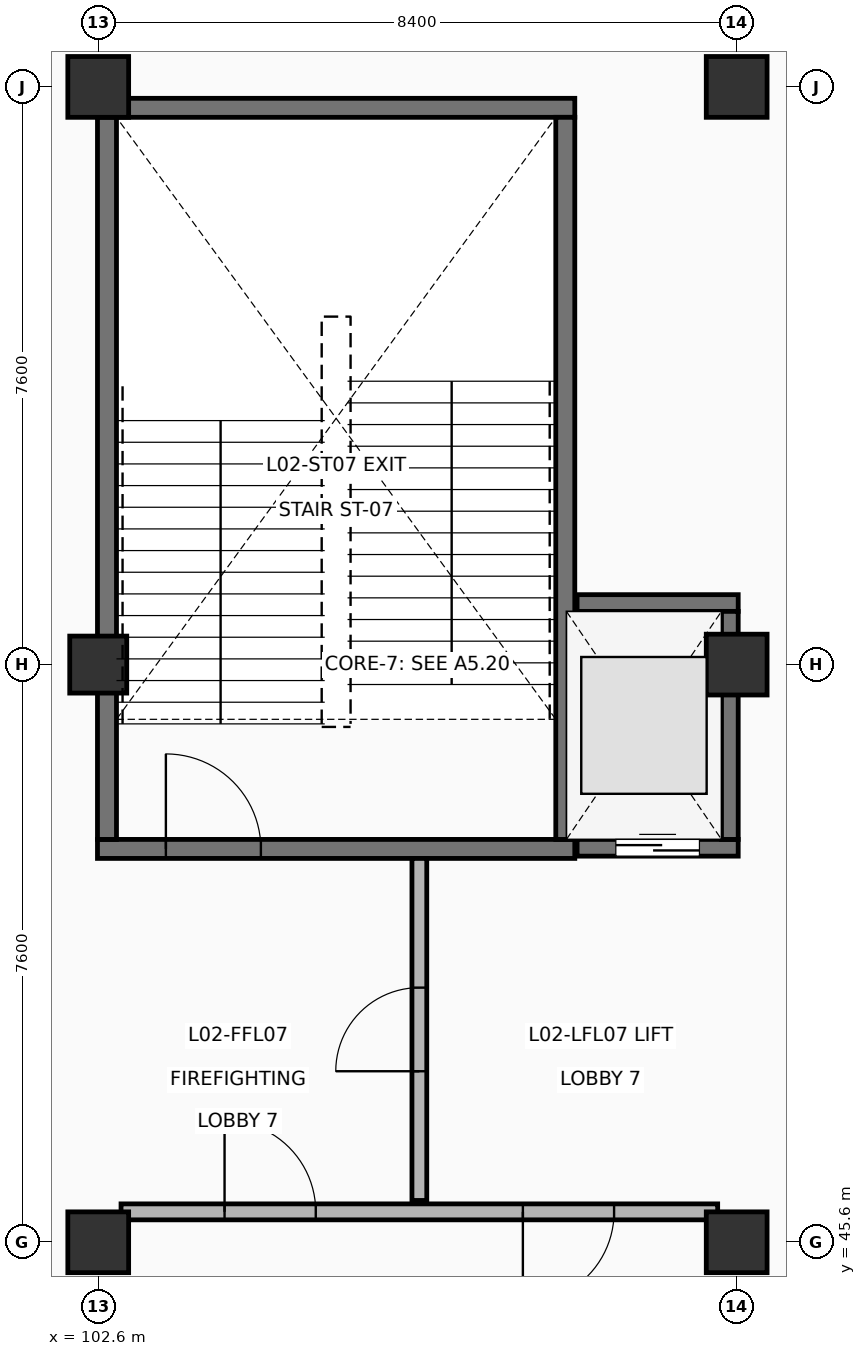
"""IFC4 building model, lengths in metres.
Left out: names, types, materials, properties, quantities, classifications, styles, units other than length and angle.
Written with IfcOpenShell. Run it as: python <this file> out.ifc"""

import sys

from ifc_helpers import new_model, si_unit, direction, frame, frame_2d, origin, origin_2d, place, context, subcontext, project, spatial, rectangle, circle, extrude, element, fill, save


model = new_model("IFC4")
c1 = context("Model", 3, precision=1e-05, world=origin(), true_north=direction((0.0, 1.0)))
c2 = subcontext(c1, "Body", "Model", "MODEL_VIEW")
j1 = project(units=[si_unit("LENGTHUNIT", "METRE"), si_unit("PLANEANGLEUNIT", "RADIAN")], contexts=[c1])
p1 = place(None, origin())
s1 = spatial("IfcSite", under=j1, at=p1, CompositionType="ELEMENT")
p2 = place(p1, origin())
s2 = spatial("IfcBuilding", under=s1, at=p2, CompositionType="ELEMENT")
p3 = place(p2, frame((0.0, 0.0, 5.4)))
s3 = spatial("IfcBuildingStorey", under=s2, at=p3, CompositionType="ELEMENT", Elevation=5.4)
p4 = place(p3, frame((102.6, 45.6, 0.0), z_axis=(0.0, 0.0, 1.0), x_axis=(1.0, 0.0, 0.0)))
e1 = element("IfcColumn", 1, at=p4, inside=s3, PredefinedType="COLUMN", context=c2, shape_type="SweptSolid", body=[
    extrude(rectangle(XDim=0.8, YDim=0.8, at=origin_2d()), origin(), (0.0, 0.0, 1.0), 5.1),
])
p5 = place(p3, frame((102.6, 53.2, 0.0), z_axis=(0.0, 0.0, 1.0), x_axis=(1.0, 0.0, 0.0)))
e2 = element("IfcColumn", 2, at=p5, inside=s3, PredefinedType="COLUMN", context=c2, shape_type="SweptSolid", body=[
    extrude(circle(Radius=0.375, at=origin_2d()), origin(), (0.0, 0.0, 1.0), 5.1),
])
for number, where, z_axis, x_axis in (
    (3, (102.6, 60.8, 0.0), (0.0, 0.0, 1.0), (1.0, 0.0, 0.0)),
    (4, (111.0, 45.6, 0.0), (0.0, 0.0, 1.0), (1.0, 0.0, 0.0)),
    (5, (111.0, 53.2, 0.0), (0.0, 0.0, 1.0), (1.0, 0.0, 0.0)),
    (6, (111.0, 60.8, 0.0), (0.0, 0.0, 1.0), (1.0, 0.0, 0.0)),
):
    element("IfcColumn", number, at=place(p3, frame(where, z_axis=z_axis, x_axis=x_axis)), inside=s3, PredefinedType="COLUMN", context=c2, shape_type="SweptSolid", body=[
        extrude(rectangle(XDim=0.8, YDim=0.8, at=origin_2d()), origin(), (0.0, 0.0, 1.0), 5.1),
    ])
p6 = place(p3, frame((102.59, 50.775, 0.0), z_axis=(0.0, 0.0, 1.0), x_axis=(1.0, 0.0, 0.0)))
e7 = element("IfcWall", 7, at=p6, inside=s3, PredefinedType="SHEAR", context=c2, shape_type="SweptSolid", body=[
    extrude(rectangle(XDim=6.28, YDim=0.25, at=frame_2d((3.14, 0.0))), origin(), (0.0, 0.0, 1.0), 4.86),
])
p7 = place(p6, frame((0.9, 0.0, 0.0)))
e8 = element("IfcOpeningElement", 8, at=p7, cuts=e7, PredefinedType="OPENING", context=c2, shape_type="SweptSolid", body=[
    extrude(rectangle(XDim=1.25, YDim=2.2, at=frame_2d((0.625, 1.1))), frame((0.0, 0.135, 0.0), z_axis=(0.0, -1.0, 0.0), x_axis=(1.0, 0.0, 0.0)), (0.0, 0.0, 1.0), 0.27),
])
p8 = place(p3, frame((102.59, 60.525, 0.0), z_axis=(0.0, 0.0, 1.0), x_axis=(1.0, 0.0, 0.0)))
e9 = element("IfcWall", 9, at=p8, inside=s3, PredefinedType="SHEAR", context=c2, shape_type="SweptSolid", body=[
    extrude(rectangle(XDim=6.28, YDim=0.25, at=frame_2d((3.14, 0.0))), origin(), (0.0, 0.0, 1.0), 4.86),
])
for number, where, z_axis, x_axis in (
    (10, (102.715, 50.9, 0.0), (0.0, 0.0, 1.0), (0.0, 1.0, 0.0)),
    (11, (108.745, 50.9, 0.0), (0.0, 0.0, 1.0), (0.0, 1.0, 0.0)),
):
    element("IfcWall", number, at=place(p3, frame(where, z_axis=z_axis, x_axis=x_axis)), inside=s3, PredefinedType="SHEAR", context=c2, shape_type="SweptSolid", body=[
        extrude(rectangle(XDim=9.5, YDim=0.25, at=frame_2d((4.75, 0.0))), origin(), (0.0, 0.0, 1.0), 4.86),
    ])
p9 = place(p3, frame((108.9, 50.79, 0.0), z_axis=(0.0, 0.0, 1.0), x_axis=(1.0, 0.0, 0.0)))
e12 = element("IfcWall", 12, at=p9, inside=s3, PredefinedType="SHEAR", context=c2, shape_type="SweptSolid", body=[
    extrude(rectangle(XDim=2.12, YDim=0.22, at=frame_2d((1.06, 0.0))), origin(), (0.0, 0.0, 1.0), 4.86),
])
p10 = place(p9, frame((0.51, 0.0, 0.0)))
e13 = element("IfcOpeningElement", 13, at=p10, cuts=e12, PredefinedType="OPENING", context=c2, shape_type="SweptSolid", body=[
    extrude(rectangle(XDim=1.1, YDim=2.15, at=frame_2d((0.55, 1.075))), frame((0.0, 0.12, 0.0), z_axis=(0.0, -1.0, 0.0), x_axis=(1.0, 0.0, 0.0)), (0.0, 0.0, 1.0), 0.24),
])
p11 = place(p3, frame((108.9, 54.01, 0.0), z_axis=(0.0, 0.0, 1.0), x_axis=(1.0, 0.0, 0.0)))
e14 = element("IfcWall", 14, at=p11, inside=s3, PredefinedType="SHEAR", context=c2, shape_type="SweptSolid", body=[
    extrude(rectangle(XDim=2.12, YDim=0.22, at=frame_2d((1.06, 0.0))), origin(), (0.0, 0.0, 1.0), 4.86),
])
p12 = place(p3, frame((110.91, 50.9, 0.0), z_axis=(0.0, 0.0, 1.0), x_axis=(0.0, 1.0, 0.0)))
e15 = element("IfcWall", 15, at=p12, inside=s3, PredefinedType="SHEAR", context=c2, shape_type="SweptSolid", body=[
    extrude(rectangle(XDim=3.0, YDim=0.22, at=frame_2d((1.5, 0.0))), origin(), (0.0, 0.0, 1.0), 4.86),
])
p13 = place(p3, frame((102.9, 46.0, 0.0), z_axis=(0.0, 0.0, 1.0), x_axis=(1.0, 0.0, 0.0)))
e16 = element("IfcWall", 16, at=p13, inside=s3, PredefinedType="PARTITIONING", context=c2, shape_type="SweptSolid", body=[
    extrude(rectangle(XDim=7.85, YDim=0.21, at=frame_2d((3.925, 0.0))), origin(), (0.0, 0.0, 1.0), 4.86),
])
p14 = place(p13, frame((1.362, 0.0, 0.0)))
e17 = element("IfcOpeningElement", 17, at=p14, cuts=e16, PredefinedType="OPENING", context=c2, shape_type="SweptSolid", body=[
    extrude(rectangle(XDim=1.2, YDim=2.2, at=frame_2d((0.6, 1.1))), frame((0.0, 0.115, 0.0), z_axis=(0.0, -1.0, 0.0), x_axis=(1.0, 0.0, 0.0)), (0.0, 0.0, 1.0), 0.23),
])
p15 = place(p13, frame((5.287, 0.0, 0.0)))
e18 = element("IfcOpeningElement", 18, at=p15, cuts=e16, PredefinedType="OPENING", context=c2, shape_type="SweptSolid", body=[
    extrude(rectangle(XDim=1.2, YDim=2.2, at=frame_2d((0.6, 1.1))), frame((0.0, 0.115, 0.0), z_axis=(0.0, -1.0, 0.0), x_axis=(1.0, 0.0, 0.0)), (0.0, 0.0, 1.0), 0.23),
])
p16 = place(p3, frame((106.825, 46.15, 0.0), z_axis=(0.0, 0.0, 1.0), x_axis=(0.0, 1.0, 0.0)))
e19 = element("IfcWall", 19, at=p16, inside=s3, PredefinedType="PARTITIONING", context=c2, shape_type="SweptSolid", body=[
    extrude(rectangle(XDim=4.5, YDim=0.195, at=frame_2d((2.25, 0.0))), origin(), (0.0, 0.0, 1.0), 4.86),
])
p17 = place(p16, frame((1.7, 0.0, 0.0)))
e20 = element("IfcOpeningElement", 20, at=p17, cuts=e19, PredefinedType="OPENING", context=c2, shape_type="SweptSolid", body=[
    extrude(rectangle(XDim=1.1, YDim=2.15, at=frame_2d((0.55, 1.075))), frame((0.0, 0.107, 0.0), z_axis=(0.0, -1.0, 0.0), x_axis=(1.0, 0.0, 0.0)), (0.0, 0.0, 1.0), 0.215),
])
p18 = place(p7, origin())
e21 = element("IfcDoor", 21, at=p18, inside=s3, OperationType="SINGLE_SWING_LEFT", PredefinedType="DOOR", context=c2, shape_type="SweptSolid", body=[
    extrude(rectangle(XDim=1.25, YDim=2.2, at=frame_2d((0.625, 1.1))), frame((0.0, 0.025, 0.0), z_axis=(0.0, -1.0, 0.0), x_axis=(1.0, 0.0, 0.0)), (0.0, 0.0, 1.0), 0.05),
])
fill(e8, e21)
p19 = place(p10, origin())
e22 = element("IfcDoor", 22, at=p19, inside=s3, OperationType="DOUBLE_DOOR_SLIDING", PredefinedType="DOOR", context=c2, shape_type="SweptSolid", body=[
    extrude(rectangle(XDim=1.1, YDim=2.15, at=frame_2d((0.55, 1.075))), frame((0.0, 0.025, 0.0), z_axis=(0.0, -1.0, 0.0), x_axis=(1.0, 0.0, 0.0)), (0.0, 0.0, 1.0), 0.05),
])
fill(e13, e22)
p20 = place(p14, origin())
e23 = element("IfcDoor", 23, at=p20, inside=s3, OperationType="SINGLE_SWING_LEFT", PredefinedType="DOOR", context=c2, shape_type="SweptSolid", body=[
    extrude(rectangle(XDim=1.2, YDim=2.2, at=frame_2d((0.6, 1.1))), frame((0.0, 0.025, 0.0), z_axis=(0.0, -1.0, 0.0), x_axis=(1.0, 0.0, 0.0)), (0.0, 0.0, 1.0), 0.05),
])
fill(e17, e23)
p21 = place(p15, origin())
e24 = element("IfcDoor", 24, at=p21, inside=s3, OperationType="SINGLE_SWING_RIGHT", PredefinedType="DOOR", context=c2, shape_type="SweptSolid", body=[
    extrude(rectangle(XDim=1.2, YDim=2.2, at=frame_2d((0.6, 1.1))), frame((0.0, 0.025, 0.0), z_axis=(0.0, -1.0, 0.0), x_axis=(1.0, 0.0, 0.0)), (0.0, 0.0, 1.0), 0.05),
])
fill(e18, e24)
p22 = place(p17, origin())
e25 = element("IfcDoor", 25, at=p22, inside=s3, OperationType="SINGLE_SWING_LEFT", PredefinedType="DOOR", context=c2, shape_type="SweptSolid", body=[
    extrude(rectangle(XDim=1.1, YDim=2.15, at=frame_2d((0.55, 1.075))), frame((0.0, 0.025, 0.0), z_axis=(0.0, -1.0, 0.0), x_axis=(1.0, 0.0, 0.0)), (0.0, 0.0, 1.0), 0.05),
])
fill(e20, e25)
save(model, sys.argv[1])
